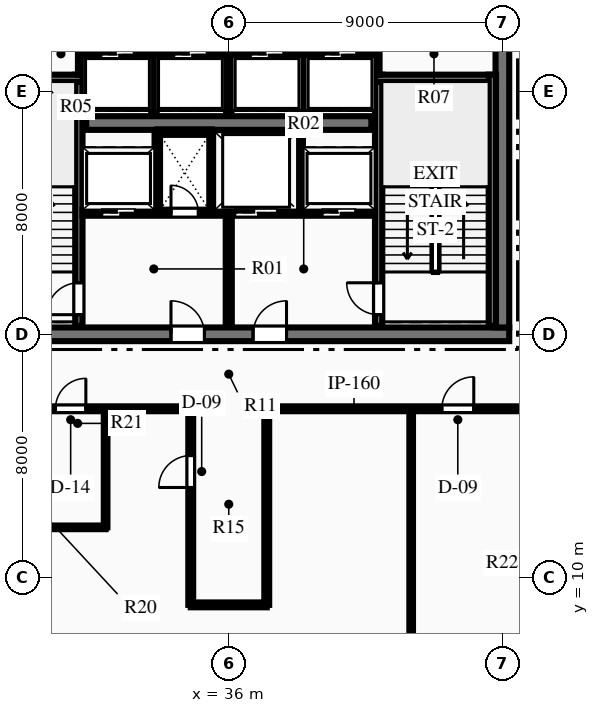
"""IFC4 building model, lengths in metres.
Left out: names, types, materials, properties, quantities, classifications, styles, units other than length and angle.
Written with IfcOpenShell. Run it as: python <this file> out.ifc"""

import sys

from ifc_helpers import new_model, si_unit, direction, frame, frame_2d, origin, place, context, subcontext, project, spatial, rectangle, extrude, element, fill, save


model = new_model("IFC4")
c1 = context("Model", 3, precision=1e-05, world=origin(), true_north=direction((0.0, 1.0)))
c2 = subcontext(c1, "Body", "Model", "MODEL_VIEW")
j1 = project(units=[si_unit("LENGTHUNIT", "METRE"), si_unit("PLANEANGLEUNIT", "RADIAN")], contexts=[c1])
p1 = place(None, origin())
s1 = spatial("IfcSite", under=j1, at=p1, CompositionType="ELEMENT")
p2 = place(p1, origin())
s2 = spatial("IfcBuilding", under=s1, at=p2, CompositionType="ELEMENT")
p3 = place(p2, frame((0.0, 0.0, 328.95)))
s3 = spatial("IfcBuildingStorey", under=s2, at=p3, CompositionType="ELEMENT", Elevation=328.95)
p4 = place(p3, frame((26.775, 18.0, 0.0), z_axis=(0.0, 0.0, 1.0), x_axis=(1.0, 0.0, 0.0)))
e1 = element("IfcWall", 1, at=p4, inside=s3, PredefinedType="SHEAR", context=c2, shape_type="SweptSolid", body=[
    extrude(rectangle(XDim=18.45, YDim=0.45, at=frame_2d((9.225, 0.0))), origin(), (0.0, 0.0, 1.0), 3.75),
])
p5 = place(p4, frame((7.325, 0.0, 0.0)))
e2 = element("IfcOpeningElement", 2, at=p5, cuts=e1, PredefinedType="OPENING", context=c2, shape_type="SweptSolid", body=[
    extrude(rectangle(XDim=1.1, YDim=2.15, at=frame_2d((0.55, 1.075))), frame((0.0, 0.235, 0.0), z_axis=(0.0, -1.0, 0.0), x_axis=(1.0, 0.0, 0.0)), (0.0, 0.0, 1.0), 0.47),
])
p6 = place(p4, frame((10.025, 0.0, 0.0)))
e3 = element("IfcOpeningElement", 3, at=p6, cuts=e1, PredefinedType="OPENING", context=c2, shape_type="SweptSolid", body=[
    extrude(rectangle(XDim=1.1, YDim=2.15, at=frame_2d((0.55, 1.075))), frame((0.0, 0.235, 0.0), z_axis=(0.0, -1.0, 0.0), x_axis=(1.0, 0.0, 0.0)), (0.0, 0.0, 1.0), 0.47),
])
p7 = place(p3, frame((45.0, 18.225, 0.0), z_axis=(0.0, 0.0, 1.0), x_axis=(0.0, 1.0, 0.0)))
e4 = element("IfcWall", 4, at=p7, inside=s3, PredefinedType="SHEAR", context=c2, shape_type="SweptSolid", body=[
    extrude(rectangle(XDim=15.55, YDim=0.45, at=frame_2d((7.775, 0.0))), origin(), (0.0, 0.0, 1.0), 3.75),
])
p8 = place(p7, frame((10.015, 0.0, 0.0)))
e5 = element("IfcOpeningElement", 5, at=p8, cuts=e4, PredefinedType="OPENING", context=c2, shape_type="SweptSolid", body=[
    extrude(rectangle(XDim=1.4, YDim=2.2, at=frame_2d((0.7, 1.1))), frame((0.0, 0.235, 0.0), z_axis=(0.0, -1.0, 0.0), x_axis=(1.0, 0.0, 0.0)), (0.0, 0.0, 1.0), 0.47),
])
p9 = place(p3, frame((31.31, 24.95, 0.0), z_axis=(0.0, 0.0, 1.0), x_axis=(1.0, 0.0, 0.0)))
e6 = element("IfcWall", 6, at=p9, inside=s3, PredefinedType="SHEAR", context=c2, shape_type="SweptSolid", body=[
    extrude(rectangle(XDim=9.38, YDim=0.45, at=frame_2d((4.69, 0.0))), origin(), (0.0, 0.0, 1.0), 3.75),
])
p10 = place(p3, frame((31.07, 18.28, 0.0), z_axis=(0.0, 0.0, 1.0), x_axis=(0.0, 1.0, 0.0)))
e7 = element("IfcWall", 7, at=p10, inside=s3, PredefinedType="SHEAR", context=c2, shape_type="SweptSolid", body=[
    extrude(rectangle(XDim=8.26, YDim=0.24, at=frame_2d((4.13, 0.0))), origin(), (0.0, 0.0, 1.0), 3.75),
])
p11 = place(p10, frame((0.365, 0.0, 0.0)))
e8 = element("IfcOpeningElement", 8, at=p11, cuts=e7, PredefinedType="OPENING", context=c2, shape_type="SweptSolid", body=[
    extrude(rectangle(XDim=1.05, YDim=2.15, at=frame_2d((0.525, 1.075))), frame((0.0, 0.13, 0.0), z_axis=(0.0, -1.0, 0.0), x_axis=(1.0, 0.0, 0.0)), (0.0, 0.0, 1.0), 0.26),
])
p12 = place(p3, frame((27.21, 26.42, 0.0), z_axis=(0.0, 0.0, 1.0), x_axis=(1.0, 0.0, 0.0)))
e9 = element("IfcWall", 9, at=p12, inside=s3, PredefinedType="SHEAR", context=c2, shape_type="SweptSolid", body=[
    extrude(rectangle(XDim=3.98, YDim=0.24, at=frame_2d((1.99, 0.0))), origin(), (0.0, 0.0, 1.0), 3.75),
])
p13 = place(p3, frame((40.93, 18.28, 0.0), z_axis=(0.0, 0.0, 1.0), x_axis=(0.0, 1.0, 0.0)))
e10 = element("IfcWall", 10, at=p13, inside=s3, PredefinedType="SHEAR", context=c2, shape_type="SweptSolid", body=[
    extrude(rectangle(XDim=8.26, YDim=0.24, at=frame_2d((4.13, 0.0))), origin(), (0.0, 0.0, 1.0), 3.75),
])
p14 = place(p13, frame((0.365, 0.0, 0.0)))
e11 = element("IfcOpeningElement", 11, at=p14, cuts=e10, PredefinedType="OPENING", context=c2, shape_type="SweptSolid", body=[
    extrude(rectangle(XDim=1.05, YDim=2.15, at=frame_2d((0.525, 1.075))), frame((0.0, 0.13, 0.0), z_axis=(0.0, -1.0, 0.0), x_axis=(1.0, 0.0, 0.0)), (0.0, 0.0, 1.0), 0.26),
])
p15 = place(p3, frame((40.81, 26.42, 0.0), z_axis=(0.0, 0.0, 1.0), x_axis=(1.0, 0.0, 0.0)))
e12 = element("IfcWall", 12, at=p15, inside=s3, PredefinedType="SHEAR", context=c2, shape_type="SweptSolid", body=[
    extrude(rectangle(XDim=3.98, YDim=0.24, at=frame_2d((1.99, 0.0))), origin(), (0.0, 0.0, 1.0), 3.75),
])
p16 = place(p3, frame((44.67, 18.28, 0.0), z_axis=(0.0, 0.0, 1.0), x_axis=(0.0, 1.0, 0.0)))
e13 = element("IfcWall", 13, at=p16, inside=s3, PredefinedType="SHEAR", context=c2, shape_type="SweptSolid", body=[
    extrude(rectangle(XDim=8.26, YDim=0.24, at=frame_2d((4.13, 0.0))), origin(), (0.0, 0.0, 1.0), 3.75),
])
p17 = place(p3, frame((36.0, 18.28, 0.0), z_axis=(0.0, 0.0, 1.0), x_axis=(0.0, 1.0, 0.0)))
e14 = element("IfcWall", 14, at=p17, inside=s3, PredefinedType="PARTITIONING", context=c2, shape_type="SweptSolid", body=[
    extrude(rectangle(XDim=3.77, YDim=0.2, at=frame_2d((1.885, 0.0))), origin(), (0.0, 0.0, 1.0), 3.49),
])
p18 = place(p3, frame((31.19, 22.0, 0.0), z_axis=(0.0, 0.0, 1.0), x_axis=(1.0, 0.0, 0.0)))
e15 = element("IfcWall", 15, at=p18, inside=s3, PredefinedType="PARTITIONING", context=c2, shape_type="SweptSolid", body=[
    extrude(rectangle(XDim=4.69, YDim=0.2, at=frame_2d((2.345, 0.0))), origin(), (0.0, 0.0, 1.0), 3.49),
])
p19 = place(p18, frame((2.91, 0.0, 0.0)))
e16 = element("IfcOpeningElement", 16, at=p19, cuts=e15, PredefinedType="OPENING", context=c2, shape_type="SweptSolid", body=[
    extrude(rectangle(XDim=0.9, YDim=2.15, at=frame_2d((0.45, 1.075))), frame((0.0, 0.11, 0.0), z_axis=(0.0, -1.0, 0.0), x_axis=(1.0, 0.0, 0.0)), (0.0, 0.0, 1.0), 0.22),
])
p20 = place(p18, frame((0.635, 0.0, 0.0)))
e17 = element("IfcOpeningElement", 17, at=p20, cuts=e15, PredefinedType="OPENING", context=c2, shape_type="SweptSolid", body=[
    extrude(rectangle(XDim=1.1, YDim=2.15, at=frame_2d((0.55, 1.075))), frame((0.0, 0.11, 0.0), z_axis=(0.0, -1.0, 0.0), x_axis=(1.0, 0.0, 0.0)), (0.0, 0.0, 1.0), 0.22),
])
p21 = place(p3, frame((36.12, 22.0, 0.0), z_axis=(0.0, 0.0, 1.0), x_axis=(1.0, 0.0, 0.0)))
e18 = element("IfcWall", 18, at=p21, inside=s3, PredefinedType="PARTITIONING", context=c2, shape_type="SweptSolid", body=[
    extrude(rectangle(XDim=4.69, YDim=0.2, at=frame_2d((2.345, 0.0))), origin(), (0.0, 0.0, 1.0), 3.49),
])
p22 = place(p21, frame((2.955, 0.0, 0.0)))
e19 = element("IfcOpeningElement", 19, at=p22, cuts=e18, PredefinedType="OPENING", context=c2, shape_type="SweptSolid", body=[
    extrude(rectangle(XDim=1.1, YDim=2.15, at=frame_2d((0.55, 1.075))), frame((0.0, 0.11, 0.0), z_axis=(0.0, -1.0, 0.0), x_axis=(1.0, 0.0, 0.0)), (0.0, 0.0, 1.0), 0.22),
])
p23 = place(p21, frame((0.08, 0.0, 0.0)))
e20 = element("IfcOpeningElement", 20, at=p23, cuts=e18, PredefinedType="OPENING", context=c2, shape_type="SweptSolid", body=[
    extrude(rectangle(XDim=1.4, YDim=2.2, at=frame_2d((0.7, 1.1))), frame((0.0, 0.11, 0.0), z_axis=(0.0, -1.0, 0.0), x_axis=(1.0, 0.0, 0.0)), (0.0, 0.0, 1.0), 0.22),
])
for number, where, z_axis, x_axis in (
    (21, (33.65, 22.05, 0.0), (0.0, 0.0, 1.0), (0.0, 1.0, 0.0)),
    (22, (35.45, 22.05, 0.0), (0.0, 0.0, 1.0), (0.0, 1.0, 0.0)),
):
    element("IfcWall", number, at=place(p3, frame(where, z_axis=z_axis, x_axis=x_axis)), inside=s3, PredefinedType="PARTITIONING", context=c2, shape_type="SweptSolid", body=[
        extrude(rectangle(XDim=2.6, YDim=0.18, at=frame_2d((1.3, 0.0))), origin(), (0.0, 0.0, 1.0), 3.49),
    ])
p24 = place(p3, frame((33.65, 24.65, 0.0), z_axis=(0.0, 0.0, 1.0), x_axis=(1.0, 0.0, 0.0)))
e23 = element("IfcWall", 23, at=p24, inside=s3, PredefinedType="PARTITIONING", context=c2, shape_type="SweptSolid", body=[
    extrude(rectangle(XDim=1.8, YDim=0.18, at=frame_2d((0.9, 0.0))), origin(), (0.0, 0.0, 1.0), 3.49),
])
p25 = place(p3, frame((38.35, 22.05, 0.0), z_axis=(0.0, 0.0, 1.0), x_axis=(0.0, 1.0, 0.0)))
e24 = element("IfcWall", 24, at=p25, inside=s3, PredefinedType="PARTITIONING", context=c2, shape_type="SweptSolid", body=[
    extrude(rectangle(XDim=2.6, YDim=0.18, at=frame_2d((1.3, 0.0))), origin(), (0.0, 0.0, 1.0), 3.49),
])
for number, where, z_axis, x_axis in (
    (25, (31.12, 26.54, 0.0), (0.0, 0.0, 1.0), (0.0, 1.0, 0.0)),
    (26, (40.88, 26.54, 0.0), (0.0, 0.0, 1.0), (0.0, 1.0, 0.0)),
):
    element("IfcWall", number, at=place(p3, frame(where, z_axis=z_axis, x_axis=x_axis)), inside=s3, PredefinedType="PARTITIONING", context=c2, shape_type="SweptSolid", body=[
        extrude(rectangle(XDim=1.51, YDim=0.16, at=frame_2d((0.755, 0.0))), origin(), (0.0, 0.0, 1.0), 3.49),
    ])
p26 = place(p3, frame((31.2, 27.2, 0.0), z_axis=(0.0, 0.0, 1.0), x_axis=(1.0, 0.0, 0.0)))
e27 = element("IfcWall", 27, at=p26, inside=s3, PredefinedType="PARTITIONING", context=c2, shape_type="SweptSolid", body=[
    extrude(rectangle(XDim=9.6, YDim=0.18, at=frame_2d((4.8, 0.0))), origin(), (0.0, 0.0, 1.0), 3.49),
])
p27 = place(p26, frame((0.59, 0.0, 0.0)))
e28 = element("IfcOpeningElement", 28, at=p27, cuts=e27, PredefinedType="OPENING", context=c2, shape_type="SweptSolid", body=[
    extrude(rectangle(XDim=1.1, YDim=2.15, at=frame_2d((0.55, 1.075))), frame((0.0, 0.1, 0.0), z_axis=(0.0, -1.0, 0.0), x_axis=(1.0, 0.0, 0.0)), (0.0, 0.0, 1.0), 0.2),
])
p28 = place(p26, frame((2.99, 0.0, 0.0)))
e29 = element("IfcOpeningElement", 29, at=p28, cuts=e27, PredefinedType="OPENING", context=c2, shape_type="SweptSolid", body=[
    extrude(rectangle(XDim=1.1, YDim=2.15, at=frame_2d((0.55, 1.075))), frame((0.0, 0.1, 0.0), z_axis=(0.0, -1.0, 0.0), x_axis=(1.0, 0.0, 0.0)), (0.0, 0.0, 1.0), 0.2),
])
p29 = place(p26, frame((5.51, 0.0, 0.0)))
e30 = element("IfcOpeningElement", 30, at=p29, cuts=e27, PredefinedType="OPENING", context=c2, shape_type="SweptSolid", body=[
    extrude(rectangle(XDim=1.1, YDim=2.15, at=frame_2d((0.55, 1.075))), frame((0.0, 0.1, 0.0), z_axis=(0.0, -1.0, 0.0), x_axis=(1.0, 0.0, 0.0)), (0.0, 0.0, 1.0), 0.2),
])
p30 = place(p26, frame((7.91, 0.0, 0.0)))
e31 = element("IfcOpeningElement", 31, at=p30, cuts=e27, PredefinedType="OPENING", context=c2, shape_type="SweptSolid", body=[
    extrude(rectangle(XDim=1.1, YDim=2.15, at=frame_2d((0.55, 1.075))), frame((0.0, 0.1, 0.0), z_axis=(0.0, -1.0, 0.0), x_axis=(1.0, 0.0, 0.0)), (0.0, 0.0, 1.0), 0.2),
])
for number, where, z_axis, x_axis in (
    (32, (33.54, 25.3, 0.0), (0.0, 0.0, 1.0), (0.0, 1.0, 0.0)),
    (33, (36.0, 25.3, 0.0), (0.0, 0.0, 1.0), (0.0, 1.0, 0.0)),
    (34, (38.46, 25.3, 0.0), (0.0, 0.0, 1.0), (0.0, 1.0, 0.0)),
):
    element("IfcWall", number, at=place(p3, frame(where, z_axis=z_axis, x_axis=x_axis)), inside=s3, PredefinedType="PARTITIONING", context=c2, shape_type="SweptSolid", body=[
        extrude(rectangle(XDim=1.9, YDim=0.18, at=frame_2d((0.95, 0.0))), origin(), (0.0, 0.0, 1.0), 3.49),
    ])
p31 = place(p3, frame((24.5, 15.55, 0.0), z_axis=(0.0, 0.0, 1.0), x_axis=(1.0, 0.0, 0.0)))
e35 = element("IfcWall", 35, at=p31, inside=s3, PredefinedType="PARTITIONING", context=c2, shape_type="SweptSolid", body=[
    extrude(rectangle(XDim=10.25, YDim=0.16, at=frame_2d((5.125, 0.0))), origin(), (0.0, 0.0, 1.0), 3.49),
])
p32 = place(p31, frame((1.25, 0.0, 0.0)))
e36 = element("IfcOpeningElement", 36, at=p32, cuts=e35, PredefinedType="OPENING", context=c2, shape_type="SweptSolid", body=[
    extrude(rectangle(XDim=0.9, YDim=2.15, at=frame_2d((0.45, 1.075))), frame((0.0, 0.09, 0.0), z_axis=(0.0, -1.0, 0.0), x_axis=(1.0, 0.0, 0.0)), (0.0, 0.0, 1.0), 0.18),
])
p33 = place(p31, frame((3.55, 0.0, 0.0)))
e37 = element("IfcOpeningElement", 37, at=p33, cuts=e35, PredefinedType="OPENING", context=c2, shape_type="SweptSolid", body=[
    extrude(rectangle(XDim=0.9, YDim=2.15, at=frame_2d((0.45, 1.075))), frame((0.0, 0.09, 0.0), z_axis=(0.0, -1.0, 0.0), x_axis=(1.0, 0.0, 0.0)), (0.0, 0.0, 1.0), 0.18),
])
p34 = place(p31, frame((5.8, 0.0, 0.0)))
e38 = element("IfcOpeningElement", 38, at=p34, cuts=e35, PredefinedType="OPENING", context=c2, shape_type="SweptSolid", body=[
    extrude(rectangle(XDim=1.0, YDim=2.15, at=frame_2d((0.5, 1.075))), frame((0.0, 0.09, 0.0), z_axis=(0.0, -1.0, 0.0), x_axis=(1.0, 0.0, 0.0)), (0.0, 0.0, 1.0), 0.18),
])
p35 = place(p3, frame((37.25, 15.55, 0.0), z_axis=(0.0, 0.0, 1.0), x_axis=(1.0, 0.0, 0.0)))
e39 = element("IfcWall", 39, at=p35, inside=s3, PredefinedType="PARTITIONING", context=c2, shape_type="SweptSolid", body=[
    extrude(rectangle(XDim=10.25, YDim=0.16, at=frame_2d((5.125, 0.0))), origin(), (0.0, 0.0, 1.0), 3.49),
])
p36 = place(p35, frame((5.759, 0.0, 0.0)))
e40 = element("IfcOpeningElement", 40, at=p36, cuts=e39, PredefinedType="OPENING", context=c2, shape_type="SweptSolid", body=[
    extrude(rectangle(XDim=1.05, YDim=2.15, at=frame_2d((0.525, 1.075))), frame((0.0, 0.09, 0.0), z_axis=(0.0, -1.0, 0.0), x_axis=(1.0, 0.0, 0.0)), (0.0, 0.0, 1.0), 0.18),
])
p37 = place(p3, frame((34.75, 9.1, 0.0), z_axis=(0.0, 0.0, 1.0), x_axis=(0.0, 1.0, 0.0)))
e41 = element("IfcWall", 41, at=p37, inside=s3, PredefinedType="PARTITIONING", context=c2, shape_type="SweptSolid", body=[
    extrude(rectangle(XDim=6.45, YDim=0.16, at=frame_2d((3.225, 0.0))), origin(), (0.0, 0.0, 1.0), 3.49),
])
p38 = place(p37, frame((3.861, 0.0, 0.0)))
e42 = element("IfcOpeningElement", 42, at=p38, cuts=e41, PredefinedType="OPENING", context=c2, shape_type="SweptSolid", body=[
    extrude(rectangle(XDim=1.05, YDim=2.15, at=frame_2d((0.525, 1.075))), frame((0.0, 0.09, 0.0), z_axis=(0.0, -1.0, 0.0), x_axis=(1.0, 0.0, 0.0)), (0.0, 0.0, 1.0), 0.18),
])
p39 = place(p3, frame((37.25, 9.1, 0.0), z_axis=(0.0, 0.0, 1.0), x_axis=(0.0, 1.0, 0.0)))
e43 = element("IfcWall", 43, at=p39, inside=s3, PredefinedType="PARTITIONING", context=c2, shape_type="SweptSolid", body=[
    extrude(rectangle(XDim=6.45, YDim=0.16, at=frame_2d((3.225, 0.0))), origin(), (0.0, 0.0, 1.0), 3.49),
])
p40 = place(p3, frame((34.75, 9.1, 0.0), z_axis=(0.0, 0.0, 1.0), x_axis=(1.0, 0.0, 0.0)))
e44 = element("IfcWall", 44, at=p40, inside=s3, PredefinedType="PARTITIONING", context=c2, shape_type="SweptSolid", body=[
    extrude(rectangle(XDim=2.5, YDim=0.16, at=frame_2d((1.25, 0.0))), origin(), (0.0, 0.0, 1.0), 3.49),
])
p41 = place(p3, frame((31.95, 11.65, 0.0), z_axis=(0.0, 0.0, 1.0), x_axis=(0.0, 1.0, 0.0)))
e45 = element("IfcWall", 45, at=p41, inside=s3, PredefinedType="PARTITIONING", context=c2, shape_type="SweptSolid", body=[
    extrude(rectangle(XDim=3.9, YDim=0.12, at=frame_2d((1.95, 0.0))), origin(), (0.0, 0.0, 1.0), 3.49),
])
p42 = place(p3, frame((25.05, 11.65, 0.0), z_axis=(0.0, 0.0, 1.0), x_axis=(1.0, 0.0, 0.0)))
e46 = element("IfcWall", 46, at=p42, inside=s3, PredefinedType="PARTITIONING", context=c2, shape_type="SweptSolid", body=[
    extrude(rectangle(XDim=6.9, YDim=0.12, at=frame_2d((3.45, 0.0))), origin(), (0.0, 0.0, 1.0), 3.49),
])
p43 = place(p3, frame((42.0, 3.758, 0.0), z_axis=(0.0, 0.0, 1.0), x_axis=(0.0, 1.0, 0.0)))
e47 = element("IfcWall", 47, at=p43, inside=s3, PredefinedType="PARTITIONING", context=c2, shape_type="SweptSolid", body=[
    extrude(rectangle(XDim=11.792, YDim=0.12, at=frame_2d((5.896, 0.0))), origin(), (0.0, 0.0, 1.0), 3.49),
])
p44 = place(p11, origin())
e48 = element("IfcDoor", 48, at=p44, inside=s3, OperationType="SINGLE_SWING_LEFT", PredefinedType="DOOR", context=c2, shape_type="SweptSolid", body=[
    extrude(rectangle(XDim=1.05, YDim=2.15, at=frame_2d((0.525, 1.075))), frame((0.0, 0.025, 0.0), z_axis=(0.0, -1.0, 0.0), x_axis=(1.0, 0.0, 0.0)), (0.0, 0.0, 1.0), 0.05),
])
fill(e8, e48)
p45 = place(p14, origin())
e49 = element("IfcDoor", 49, at=p45, inside=s3, OperationType="SINGLE_SWING_RIGHT", PredefinedType="DOOR", context=c2, shape_type="SweptSolid", body=[
    extrude(rectangle(XDim=1.05, YDim=2.15, at=frame_2d((0.525, 1.075))), frame((0.0, 0.025, 0.0), z_axis=(0.0, -1.0, 0.0), x_axis=(1.0, 0.0, 0.0)), (0.0, 0.0, 1.0), 0.05),
])
fill(e11, e49)
p46 = place(p5, origin())
e50 = element("IfcDoor", 50, at=p46, inside=s3, OperationType="SINGLE_SWING_LEFT", PredefinedType="DOOR", context=c2, shape_type="SweptSolid", body=[
    extrude(rectangle(XDim=1.1, YDim=2.15, at=frame_2d((0.55, 1.075))), frame((0.0, 0.025, 0.0), z_axis=(0.0, -1.0, 0.0), x_axis=(1.0, 0.0, 0.0)), (0.0, 0.0, 1.0), 0.05),
])
fill(e2, e50)
p47 = place(p6, origin())
e51 = element("IfcDoor", 51, at=p47, inside=s3, OperationType="SINGLE_SWING_RIGHT", PredefinedType="DOOR", context=c2, shape_type="SweptSolid", body=[
    extrude(rectangle(XDim=1.1, YDim=2.15, at=frame_2d((0.55, 1.075))), frame((0.0, 0.025, 0.0), z_axis=(0.0, -1.0, 0.0), x_axis=(1.0, 0.0, 0.0)), (0.0, 0.0, 1.0), 0.05),
])
fill(e3, e51)
p48 = place(p19, origin())
e52 = element("IfcDoor", 52, at=p48, inside=s3, OperationType="SINGLE_SWING_LEFT", PredefinedType="DOOR", context=c2, shape_type="SweptSolid", body=[
    extrude(rectangle(XDim=0.9, YDim=2.15, at=frame_2d((0.45, 1.075))), frame((0.0, 0.025, 0.0), z_axis=(0.0, -1.0, 0.0), x_axis=(1.0, 0.0, 0.0)), (0.0, 0.0, 1.0), 0.05),
])
fill(e16, e52)
p49 = place(p34, origin())
e53 = element("IfcDoor", 53, at=p49, inside=s3, OperationType="SINGLE_SWING_RIGHT", PredefinedType="DOOR", context=c2, shape_type="SweptSolid", body=[
    extrude(rectangle(XDim=1.0, YDim=2.15, at=frame_2d((0.5, 1.075))), frame((0.0, 0.025, 0.0), z_axis=(0.0, -1.0, 0.0), x_axis=(1.0, 0.0, 0.0)), (0.0, 0.0, 1.0), 0.05),
])
fill(e38, e53)
p50 = place(p38, origin())
e54 = element("IfcDoor", 54, at=p50, inside=s3, OperationType="SINGLE_SWING_LEFT", PredefinedType="DOOR", context=c2, shape_type="SweptSolid", body=[
    extrude(rectangle(XDim=1.05, YDim=2.15, at=frame_2d((0.525, 1.075))), frame((0.0, 0.025, 0.0), z_axis=(0.0, -1.0, 0.0), x_axis=(1.0, 0.0, 0.0)), (0.0, 0.0, 1.0), 0.05),
])
fill(e42, e54)
p51 = place(p36, origin())
e55 = element("IfcDoor", 55, at=p51, inside=s3, OperationType="SINGLE_SWING_RIGHT", PredefinedType="DOOR", context=c2, shape_type="SweptSolid", body=[
    extrude(rectangle(XDim=1.05, YDim=2.15, at=frame_2d((0.525, 1.075))), frame((0.0, 0.025, 0.0), z_axis=(0.0, -1.0, 0.0), x_axis=(1.0, 0.0, 0.0)), (0.0, 0.0, 1.0), 0.05),
])
fill(e40, e55)
p52 = place(p27, origin())
e56 = element("IfcDoor", 56, at=p52, inside=s3, OperationType="SLIDING_TO_LEFT", PredefinedType="DOOR", context=c2, shape_type="SweptSolid", body=[
    extrude(rectangle(XDim=1.1, YDim=2.15, at=frame_2d((0.55, 1.075))), frame((0.0, 0.025, 0.0), z_axis=(0.0, -1.0, 0.0), x_axis=(1.0, 0.0, 0.0)), (0.0, 0.0, 1.0), 0.05),
])
fill(e28, e56)
p53 = place(p28, origin())
e57 = element("IfcDoor", 57, at=p53, inside=s3, OperationType="SLIDING_TO_LEFT", PredefinedType="DOOR", context=c2, shape_type="SweptSolid", body=[
    extrude(rectangle(XDim=1.1, YDim=2.15, at=frame_2d((0.55, 1.075))), frame((0.0, 0.025, 0.0), z_axis=(0.0, -1.0, 0.0), x_axis=(1.0, 0.0, 0.0)), (0.0, 0.0, 1.0), 0.05),
])
fill(e29, e57)
p54 = place(p29, origin())
e58 = element("IfcDoor", 58, at=p54, inside=s3, OperationType="SLIDING_TO_LEFT", PredefinedType="DOOR", context=c2, shape_type="SweptSolid", body=[
    extrude(rectangle(XDim=1.1, YDim=2.15, at=frame_2d((0.55, 1.075))), frame((0.0, 0.025, 0.0), z_axis=(0.0, -1.0, 0.0), x_axis=(1.0, 0.0, 0.0)), (0.0, 0.0, 1.0), 0.05),
])
fill(e30, e58)
p55 = place(p30, origin())
e59 = element("IfcDoor", 59, at=p55, inside=s3, OperationType="SLIDING_TO_LEFT", PredefinedType="DOOR", context=c2, shape_type="SweptSolid", body=[
    extrude(rectangle(XDim=1.1, YDim=2.15, at=frame_2d((0.55, 1.075))), frame((0.0, 0.025, 0.0), z_axis=(0.0, -1.0, 0.0), x_axis=(1.0, 0.0, 0.0)), (0.0, 0.0, 1.0), 0.05),
])
fill(e31, e59)
p56 = place(p20, origin())
e60 = element("IfcDoor", 60, at=p56, inside=s3, OperationType="SLIDING_TO_LEFT", PredefinedType="DOOR", context=c2, shape_type="SweptSolid", body=[
    extrude(rectangle(XDim=1.1, YDim=2.15, at=frame_2d((0.55, 1.075))), frame((0.0, 0.025, 0.0), z_axis=(0.0, -1.0, 0.0), x_axis=(1.0, 0.0, 0.0)), (0.0, 0.0, 1.0), 0.05),
])
fill(e17, e60)
p57 = place(p22, origin())
e61 = element("IfcDoor", 61, at=p57, inside=s3, OperationType="SLIDING_TO_LEFT", PredefinedType="DOOR", context=c2, shape_type="SweptSolid", body=[
    extrude(rectangle(XDim=1.1, YDim=2.15, at=frame_2d((0.55, 1.075))), frame((0.0, 0.025, 0.0), z_axis=(0.0, -1.0, 0.0), x_axis=(1.0, 0.0, 0.0)), (0.0, 0.0, 1.0), 0.05),
])
fill(e19, e61)
p58 = place(p23, origin())
e62 = element("IfcDoor", 62, at=p58, inside=s3, OperationType="SLIDING_TO_LEFT", PredefinedType="DOOR", context=c2, shape_type="SweptSolid", body=[
    extrude(rectangle(XDim=1.4, YDim=2.2, at=frame_2d((0.7, 1.1))), frame((0.0, 0.025, 0.0), z_axis=(0.0, -1.0, 0.0), x_axis=(1.0, 0.0, 0.0)), (0.0, 0.0, 1.0), 0.05),
])
fill(e20, e62)
save(model, sys.argv[1])
